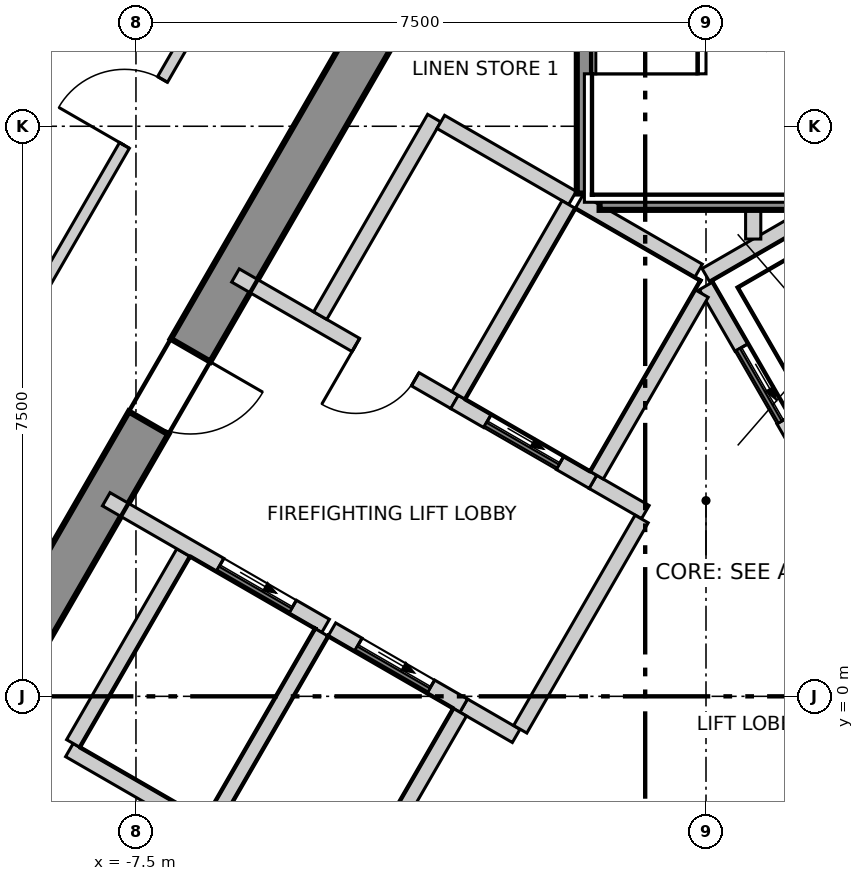
"""IFC4 building model, lengths in metres.
Left out: names, types, materials, properties, quantities, classifications, styles, units other than length and angle.
Written with IfcOpenShell. Run it as: python <this file> out.ifc"""

import sys

from ifc_helpers import new_model, si_unit, direction, frame, frame_2d, origin, place, context, subcontext, project, spatial, polyline, rectangle, outline, extrude, element, fill, save


model = new_model("IFC4")
c1 = context("Model", 3, precision=1e-05, world=origin(), true_north=direction((0.0, 1.0)))
c2 = subcontext(c1, "Body", "Model", "MODEL_VIEW")
j1 = project(units=[si_unit("LENGTHUNIT", "METRE"), si_unit("PLANEANGLEUNIT", "RADIAN")], contexts=[c1])
p1 = place(None, origin())
s1 = spatial("IfcSite", under=j1, at=p1, CompositionType="ELEMENT")
p2 = place(p1, origin())
s2 = spatial("IfcBuilding", under=s1, at=p2, CompositionType="ELEMENT")
p3 = place(p2, frame((0.0, 0.0, 300.7)))
s3 = spatial("IfcBuildingStorey", under=s2, at=p3, CompositionType="ELEMENT", Elevation=300.7)
p4 = place(p3, frame((-1.732, 13.3, -0.3), z_axis=(0.0, 0.0, 1.0), x_axis=(-0.500000539815, -0.866025092122, 0.0)))
e1 = element("IfcWall", 1, at=p4, inside=s3, PredefinedType="SHEAR", context=c2, shape_type="SweptSolid", body=[
    extrude(outline(polyline([(-0.173, -0.3), (1.795, -0.3), (3.763, -0.3), (5.732, -0.3), (7.7, -0.3), (9.668, -0.301), (11.637, -0.301), (13.605, -0.301), (15.573, -0.301), (17.542, -0.301), (19.51, -0.301), (21.478, -0.301), (21.131, 0.3), (19.226, 0.3), (17.321, 0.3), (15.415, 0.3), (13.51, 0.3), (11.605, 0.3), (9.699, 0.3), (7.794, 0.3), (5.889, 0.3), (3.984, 0.3), (2.078, 0.3), (0.173, 0.3), (-0.173, -0.3)])), origin(), (0.0, 0.0, 1.0), 3.6),
])
p5 = place(p4, frame((10.102, 0.0, 0.3)))
e2 = element("IfcOpeningElement", 2, at=p5, cuts=e1, PredefinedType="OPENING", context=c2, shape_type="SweptSolid", body=[
    extrude(rectangle(XDim=1.1, YDim=2.1, at=frame_2d((0.55, 1.05))), frame((0.0, 0.31, 0.0), z_axis=(0.0, -1.0, 0.0), x_axis=(1.0, 0.0, 0.0)), (0.0, 0.0, 1.0), 0.621),
])
p6 = place(p4, frame((16.378, 0.0, 0.3)))
e3 = element("IfcOpeningElement", 3, at=p6, cuts=e1, PredefinedType="OPENING", context=c2, shape_type="SweptSolid", body=[
    extrude(rectangle(XDim=0.9, YDim=2.1, at=frame_2d((0.45, 1.05))), frame((0.0, 0.31, 0.0), z_axis=(0.0, -1.0, 0.0), x_axis=(1.0, 0.0, 0.0)), (0.0, 0.0, 1.0), 0.621),
])
p7 = place(p4, frame((4.026, 0.0, 0.3)))
e4 = element("IfcOpeningElement", 4, at=p7, cuts=e1, PredefinedType="OPENING", context=c2, shape_type="SweptSolid", body=[
    extrude(rectangle(XDim=0.9, YDim=2.1, at=frame_2d((0.45, 1.05))), frame((0.0, 0.31, 0.0), z_axis=(0.0, -1.0, 0.0), x_axis=(1.0, 0.0, 0.0)), (0.0, 0.0, 1.0), 0.621),
])
p8 = place(p3, frame((-2.453, 27.405, 0.0), z_axis=(0.0, 0.0, 1.0), x_axis=(-0.500000041859, -0.866025379617, 0.0)))
e5 = element("IfcWall", 5, at=p8, inside=s3, PredefinedType="ELEMENTEDWALL", context=c2, shape_type="SweptSolid", body=[
    extrude(rectangle(XDim=44.994, YDim=0.2, at=frame_2d((22.497, 0.0))), origin(), (0.0, 0.0, 1.0), 3.3),
])
p9 = place(p8, frame((2.103, 0.0, 0.9)))
e6 = element("IfcOpeningElement", 6, at=p9, cuts=e5, PredefinedType="OPENING", context=c2, shape_type="SweptSolid", body=[
    extrude(rectangle(XDim=3.7, YDim=2.2, at=frame_2d((1.85, 1.1))), frame((0.0, 0.11, 0.0), z_axis=(0.0, -1.0, 0.0), x_axis=(1.0, 0.0, 0.0)), (0.0, 0.0, 1.0), 0.22),
])
p10 = place(p8, frame((7.404, 0.0, 0.9)))
e7 = element("IfcOpeningElement", 7, at=p10, cuts=e5, PredefinedType="OPENING", context=c2, shape_type="SweptSolid", body=[
    extrude(rectangle(XDim=3.7, YDim=2.2, at=frame_2d((1.85, 1.1))), frame((0.0, 0.11, 0.0), z_axis=(0.0, -1.0, 0.0), x_axis=(1.0, 0.0, 0.0)), (0.0, 0.0, 1.0), 0.22),
])
p11 = place(p8, frame((12.705, 0.0, 0.9)))
e8 = element("IfcOpeningElement", 8, at=p11, cuts=e5, PredefinedType="OPENING", context=c2, shape_type="SweptSolid", body=[
    extrude(rectangle(XDim=3.7, YDim=2.2, at=frame_2d((1.85, 1.1))), frame((0.0, 0.11, 0.0), z_axis=(0.0, -1.0, 0.0), x_axis=(1.0, 0.0, 0.0)), (0.0, 0.0, 1.0), 0.22),
])
p12 = place(p8, frame((18.006, 0.0, 0.9)))
e9 = element("IfcOpeningElement", 9, at=p12, cuts=e5, PredefinedType="OPENING", context=c2, shape_type="SweptSolid", body=[
    extrude(rectangle(XDim=3.7, YDim=2.2, at=frame_2d((1.85, 1.1))), frame((0.0, 0.11, 0.0), z_axis=(0.0, -1.0, 0.0), x_axis=(1.0, 0.0, 0.0)), (0.0, 0.0, 1.0), 0.22),
])
p13 = place(p8, frame((23.307, 0.0, 0.9)))
e10 = element("IfcOpeningElement", 10, at=p13, cuts=e5, PredefinedType="OPENING", context=c2, shape_type="SweptSolid", body=[
    extrude(rectangle(XDim=3.7, YDim=2.2, at=frame_2d((1.85, 1.1))), frame((0.0, 0.11, 0.0), z_axis=(0.0, -1.0, 0.0), x_axis=(1.0, 0.0, 0.0)), (0.0, 0.0, 1.0), 0.22),
])
p14 = place(p8, frame((28.608, 0.0, 0.9)))
e11 = element("IfcOpeningElement", 11, at=p14, cuts=e5, PredefinedType="OPENING", context=c2, shape_type="SweptSolid", body=[
    extrude(rectangle(XDim=3.7, YDim=2.2, at=frame_2d((1.85, 1.1))), frame((0.0, 0.11, 0.0), z_axis=(0.0, -1.0, 0.0), x_axis=(1.0, 0.0, 0.0)), (0.0, 0.0, 1.0), 0.22),
])
p15 = place(p8, frame((33.909, 0.0, 0.9)))
e12 = element("IfcOpeningElement", 12, at=p15, cuts=e5, PredefinedType="OPENING", context=c2, shape_type="SweptSolid", body=[
    extrude(rectangle(XDim=3.7, YDim=2.2, at=frame_2d((1.85, 1.1))), frame((0.0, 0.11, 0.0), z_axis=(0.0, -1.0, 0.0), x_axis=(1.0, 0.0, 0.0)), (0.0, 0.0, 1.0), 0.22),
])
p16 = place(p8, frame((39.21, 0.0, 0.9)))
e13 = element("IfcOpeningElement", 13, at=p16, cuts=e5, PredefinedType="OPENING", context=c2, shape_type="SweptSolid", body=[
    extrude(rectangle(XDim=3.7, YDim=2.2, at=frame_2d((1.85, 1.1))), frame((0.0, 0.11, 0.0), z_axis=(0.0, -1.0, 0.0), x_axis=(1.0, 0.0, 0.0)), (0.0, 0.0, 1.0), 0.22),
])
p17 = place(p3, frame((-17.679, -10.12, 0.0), z_axis=(0.0, 0.0, 1.0), x_axis=(0.500008955215, 0.866020233427, 0.0)))
e14 = element("IfcWall", 14, at=p17, inside=s3, PredefinedType="PARTITIONING", context=c2, shape_type="SweptSolid", body=[
    extrude(rectangle(XDim=35.357, YDim=0.15, at=frame_2d((17.679, 0.0))), origin(), (0.0, 0.0, 1.0), 3.3),
])
p18 = place(p17, frame((31.307, 0.0, 0.0)))
e15 = element("IfcOpeningElement", 15, at=p18, cuts=e14, PredefinedType="OPENING", context=c2, shape_type="SweptSolid", body=[
    extrude(rectangle(XDim=1.0, YDim=2.1, at=frame_2d((0.5, 1.05))), frame((0.0, 0.085, 0.0), z_axis=(0.0, -1.0, 0.0), x_axis=(1.0, 0.0, 0.0)), (0.0, 0.0, 1.0), 0.17),
])
p19 = place(p17, frame((20.056, 0.0, 0.0)))
e16 = element("IfcOpeningElement", 16, at=p19, cuts=e14, PredefinedType="OPENING", context=c2, shape_type="SweptSolid", body=[
    extrude(rectangle(XDim=1.0, YDim=2.1, at=frame_2d((0.5, 1.05))), frame((0.0, 0.085, 0.0), z_axis=(0.0, -1.0, 0.0), x_axis=(1.0, 0.0, 0.0)), (0.0, 0.0, 1.0), 0.17),
])
p20 = place(p17, frame((13.253, 0.0, 0.0)))
e17 = element("IfcOpeningElement", 17, at=p20, cuts=e14, PredefinedType="OPENING", context=c2, shape_type="SweptSolid", body=[
    extrude(rectangle(XDim=1.0, YDim=2.1, at=frame_2d((0.5, 1.05))), frame((0.0, 0.085, 0.0), z_axis=(0.0, -1.0, 0.0), x_axis=(1.0, 0.0, 0.0)), (0.0, 0.0, 1.0), 0.17),
])
p21 = place(p17, frame((7.653, 0.0, 0.0)))
e18 = element("IfcOpeningElement", 18, at=p21, cuts=e14, PredefinedType="OPENING", context=c2, shape_type="SweptSolid", body=[
    extrude(rectangle(XDim=1.0, YDim=2.1, at=frame_2d((0.5, 1.05))), frame((0.0, 0.085, 0.0), z_axis=(0.0, -1.0, 0.0), x_axis=(1.0, 0.0, 0.0)), (0.0, 0.0, 1.0), 0.17),
])
p22 = place(p17, frame((2.952, 0.0, 0.0)))
e19 = element("IfcOpeningElement", 19, at=p22, cuts=e14, PredefinedType="OPENING", context=c2, shape_type="SweptSolid", body=[
    extrude(rectangle(XDim=1.0, YDim=2.1, at=frame_2d((0.5, 1.05))), frame((0.0, 0.085, 0.0), z_axis=(0.0, -1.0, 0.0), x_axis=(1.0, 0.0, 0.0)), (0.0, 0.0, 1.0), 0.17),
])
p23 = place(p3, frame((0.075, 20.37, 0.0), z_axis=(0.0, 0.0, 1.0), x_axis=(0.500009775255, -0.866019759965, 0.0)))
e20 = element("IfcWall", 20, at=p23, inside=s3, PredefinedType="PARTITIONING", context=c2, shape_type="SweptSolid", body=[
    extrude(rectangle(XDim=35.207, YDim=0.15, at=frame_2d((17.604, 0.0))), origin(), (0.0, 0.0, 1.0), 3.3),
])
p24 = place(p23, frame((31.307, 0.0, 0.0)))
e21 = element("IfcOpeningElement", 21, at=p24, cuts=e20, PredefinedType="OPENING", context=c2, shape_type="SweptSolid", body=[
    extrude(rectangle(XDim=1.0, YDim=2.1, at=frame_2d((0.5, 1.05))), frame((0.0, 0.085, 0.0), z_axis=(0.0, -1.0, 0.0), x_axis=(1.0, 0.0, 0.0)), (0.0, 0.0, 1.0), 0.17),
])
p25 = place(p23, frame((20.355, 0.0, 0.0)))
e22 = element("IfcOpeningElement", 22, at=p25, cuts=e20, PredefinedType="OPENING", context=c2, shape_type="SweptSolid", body=[
    extrude(rectangle(XDim=1.0, YDim=2.1, at=frame_2d((0.5, 1.05))), frame((0.0, 0.085, 0.0), z_axis=(0.0, -1.0, 0.0), x_axis=(1.0, 0.0, 0.0)), (0.0, 0.0, 1.0), 0.17),
])
p26 = place(p23, frame((24.355, 0.0, 0.0)))
e23 = element("IfcOpeningElement", 23, at=p26, cuts=e20, PredefinedType="OPENING", context=c2, shape_type="SweptSolid", body=[
    extrude(rectangle(XDim=0.9, YDim=2.1, at=frame_2d((0.45, 1.05))), frame((0.0, 0.085, 0.0), z_axis=(0.0, -1.0, 0.0), x_axis=(1.0, 0.0, 0.0)), (0.0, 0.0, 1.0), 0.17),
])
p27 = place(p23, frame((22.255, 0.0, 0.0)))
e24 = element("IfcOpeningElement", 24, at=p27, cuts=e20, PredefinedType="OPENING", context=c2, shape_type="SweptSolid", body=[
    extrude(rectangle(XDim=0.9, YDim=2.1, at=frame_2d((0.45, 1.05))), frame((0.0, 0.085, 0.0), z_axis=(0.0, -1.0, 0.0), x_axis=(1.0, 0.0, 0.0)), (0.0, 0.0, 1.0), 0.17),
])
p28 = place(p23, frame((8.453, 0.0, 0.0)))
e25 = element("IfcOpeningElement", 25, at=p28, cuts=e20, PredefinedType="OPENING", context=c2, shape_type="SweptSolid", body=[
    extrude(rectangle(XDim=1.0, YDim=2.1, at=frame_2d((0.5, 1.05))), frame((0.0, 0.085, 0.0), z_axis=(0.0, -1.0, 0.0), x_axis=(1.0, 0.0, 0.0)), (0.0, 0.0, 1.0), 0.17),
])
p29 = place(p23, frame((13.753, 0.0, 0.0)))
e26 = element("IfcOpeningElement", 26, at=p29, cuts=e20, PredefinedType="OPENING", context=c2, shape_type="SweptSolid", body=[
    extrude(rectangle(XDim=0.9, YDim=2.1, at=frame_2d((0.45, 1.05))), frame((0.0, 0.085, 0.0), z_axis=(0.0, -1.0, 0.0), x_axis=(1.0, 0.0, 0.0)), (0.0, 0.0, 1.0), 0.17),
])
p30 = place(p23, frame((11.553, 0.0, 0.0)))
e27 = element("IfcOpeningElement", 27, at=p30, cuts=e20, PredefinedType="OPENING", context=c2, shape_type="SweptSolid", body=[
    extrude(rectangle(XDim=0.9, YDim=2.1, at=frame_2d((0.45, 1.05))), frame((0.0, 0.085, 0.0), z_axis=(0.0, -1.0, 0.0), x_axis=(1.0, 0.0, 0.0)), (0.0, 0.0, 1.0), 0.17),
])
p31 = place(p23, frame((2.951, 0.0, 0.0)))
e28 = element("IfcOpeningElement", 28, at=p31, cuts=e20, PredefinedType="OPENING", context=c2, shape_type="SweptSolid", body=[
    extrude(rectangle(XDim=1.0, YDim=2.1, at=frame_2d((0.5, 1.05))), frame((0.0, 0.085, 0.0), z_axis=(0.0, -1.0, 0.0), x_axis=(1.0, 0.0, 0.0)), (0.0, 0.0, 1.0), 0.17),
])
p32 = place(p3, frame((-8.376, -0.707, 0.0), z_axis=(0.0, 0.0, 1.0), x_axis=(0.866067520717, -0.499927044236, 0.0)))
e29 = element("IfcWall", 29, at=p32, inside=s3, PredefinedType="SOLIDWALL", context=c2, shape_type="SweptSolid", body=[
    extrude(rectangle(XDim=2.1, YDim=0.2, at=frame_2d((1.05, 0.0))), origin(), (0.0, 0.0, 1.0), 3.3),
])
p33 = place(p3, frame((-8.326, -0.62, 0.0), z_axis=(0.0, 0.0, 1.0), x_axis=(0.500023687443, 0.866011727401, 0.0)))
e30 = element("IfcWall", 30, at=p33, inside=s3, PredefinedType="SOLIDWALL", context=c2, shape_type="SweptSolid", body=[
    extrude(rectangle(XDim=2.9, YDim=0.2, at=frame_2d((1.45, 0.0))), origin(), (0.0, 0.0, 1.0), 3.3),
])
p34 = place(p3, frame((-0.002, 5.541, 0.0), z_axis=(0.0, 0.0, 1.0), x_axis=(0.86600155993, 0.500041296494, 0.0)))
e31 = element("IfcWall", 31, at=p34, inside=s3, PredefinedType="SOLIDWALL", context=c2, shape_type="SweptSolid", body=[
    extrude(rectangle(XDim=4.132, YDim=0.2, at=frame_2d((2.066, 0.0))), origin(), (0.0, 0.0, 1.0), 3.3),
])
p35 = place(p3, frame((0.0, 5.4, 0.0), z_axis=(0.0, 0.0, 1.0), x_axis=(0.500103862429, -0.865965430478, 0.0)))
e32 = element("IfcWall", 32, at=p35, inside=s3, PredefinedType="SOLIDWALL", context=c2, shape_type="SweptSolid", body=[
    extrude(rectangle(XDim=2.973, YDim=0.2, at=frame_2d((1.487, 0.0))), origin(), (0.0, 0.0, 1.0), 3.3),
])
p36 = place(p35, frame((0.937, 0.0, 0.0)))
e33 = element("IfcOpeningElement", 33, at=p36, cuts=e32, PredefinedType="OPENING", context=c2, shape_type="SweptSolid", body=[
    extrude(rectangle(XDim=1.1, YDim=2.1, at=frame_2d((0.55, 1.05))), frame((0.0, 0.11, 0.0), z_axis=(0.0, -1.0, 0.0), x_axis=(1.0, 0.0, 0.0)), (0.0, 0.0, 1.0), 0.22),
])
p37 = place(p3, frame((-7.891, 2.593, 0.0), z_axis=(0.0, 0.0, 1.0), x_axis=(0.866070917804, -0.499921159118, 0.0)))
e34 = element("IfcWall", 34, at=p37, inside=s3, PredefinedType="SOLIDWALL", context=c2, shape_type="SweptSolid", body=[
    extrude(rectangle(XDim=3.333, YDim=0.2, at=frame_2d((1.666, 0.0))), origin(), (0.0, 0.0, 1.0), 3.3),
])
p38 = place(p37, frame((1.73, 0.0, 0.0)))
e35 = element("IfcOpeningElement", 35, at=p38, cuts=e34, PredefinedType="OPENING", context=c2, shape_type="SweptSolid", body=[
    extrude(rectangle(XDim=1.1, YDim=2.1, at=frame_2d((0.55, 1.05))), frame((0.0, 0.11, 0.0), z_axis=(0.0, -1.0, 0.0), x_axis=(1.0, 0.0, 0.0)), (0.0, 0.0, 1.0), 0.22),
])
p39 = place(p3, frame((-3.188, -0.122, 0.0), z_axis=(0.0, 0.0, 1.0), x_axis=(0.865705793592, -0.50055317294, 0.0)))
e36 = element("IfcWall", 36, at=p39, inside=s3, PredefinedType="SOLIDWALL", context=c2, shape_type="SweptSolid", body=[
    extrude(rectangle(XDim=0.797, YDim=0.2, at=frame_2d((0.398, 0.0))), origin(), (0.0, 0.0, 1.0), 3.3),
])
p40 = place(p3, frame((-6.191, 5.537, 0.0), z_axis=(0.0, 0.0, 1.0), x_axis=(0.866052607023, -0.499952879648, 0.0)))
e37 = element("IfcWall", 37, at=p40, inside=s3, PredefinedType="SOLIDWALL", context=c2, shape_type="SweptSolid", body=[
    extrude(rectangle(XDim=3.332, YDim=0.2, at=frame_2d((1.666, 0.0))), origin(), (0.0, 0.0, 1.0), 3.3),
])
p41 = place(p40, frame((1.83, 0.0, 0.0)))
e38 = element("IfcOpeningElement", 38, at=p41, cuts=e37, PredefinedType="OPENING", context=c2, shape_type="SweptSolid", body=[
    extrude(rectangle(XDim=0.9, YDim=2.1, at=frame_2d((0.45, 1.05))), frame((0.0, 0.11, 0.0), z_axis=(0.0, -1.0, 0.0), x_axis=(1.0, 0.0, 0.0)), (0.0, 0.0, 1.0), 0.22),
])
p42 = place(p3, frame((-1.488, 2.822, 0.0), z_axis=(0.0, 0.0, 1.0), x_axis=(0.866236612152, -0.499633997809, 0.0)))
e39 = element("IfcWall", 39, at=p42, inside=s3, PredefinedType="SOLIDWALL", context=c2, shape_type="SweptSolid", body=[
    extrude(rectangle(XDim=0.796, YDim=0.2, at=frame_2d((0.398, 0.0))), origin(), (0.0, 0.0, 1.0), 3.3),
])
p43 = place(p3, frame((-5.076, 5.009, 0.0), z_axis=(0.0, 0.0, 1.0), x_axis=(0.50002537861, 0.866010750942, 0.0)))
e40 = element("IfcWall", 40, at=p43, inside=s3, PredefinedType="SOLIDWALL", context=c2, shape_type="SweptSolid", body=[
    extrude(rectangle(XDim=3.0, YDim=0.2, at=frame_2d((1.5, 0.0))), origin(), (0.0, 0.0, 1.0), 3.3),
])
p44 = place(p3, frame((-3.489, 7.557, 0.0), z_axis=(0.0, 0.0, 1.0), x_axis=(0.866010750942, -0.50002537861, 0.0)))
e41 = element("IfcWall", 41, at=p44, inside=s3, PredefinedType="SOLIDWALL", context=c2, shape_type="SweptSolid", body=[
    extrude(rectangle(XDim=2.0, YDim=0.2, at=frame_2d((1.0, 0.0))), origin(), (0.0, 0.0, 1.0), 3.3),
])
p45 = place(p3, frame((-2.444, -0.433, 0.0), z_axis=(0.0, 0.0, 1.0), x_axis=(0.500035624827, 0.866004834804, 0.0)))
e42 = element("IfcWall", 42, at=p45, inside=s3, PredefinedType="SOLIDWALL", context=c2, shape_type="SweptSolid", body=[
    extrude(rectangle(XDim=3.194, YDim=0.2, at=frame_2d((1.597, 0.0))), origin(), (0.0, 0.0, 1.0), 3.3),
])
p46 = place(p3, frame((-6.507, -1.67, 0.0), z_axis=(0.0, 0.0, 1.0), x_axis=(0.50012328804, 0.865954211699, 0.0)))
e43 = element("IfcWall", 43, at=p46, inside=s3, PredefinedType="SOLIDWALL", context=c2, shape_type="SweptSolid", body=[
    extrude(rectangle(XDim=2.9, YDim=0.2, at=frame_2d((1.45, 0.0))), origin(), (0.0, 0.0, 1.0), 3.3),
])
p47 = place(p3, frame((-4.922, 0.879, 0.0), z_axis=(0.0, 0.0, 1.0), x_axis=(0.866073918653, -0.499915960366, 0.0)))
e44 = element("IfcWall", 44, at=p47, inside=s3, PredefinedType="SOLIDWALL", context=c2, shape_type="SweptSolid", body=[
    extrude(rectangle(XDim=2.002, YDim=0.2, at=frame_2d((1.001, 0.0))), origin(), (0.0, 0.0, 1.0), 3.3),
])
p48 = place(p47, frame((0.402, 0.0, 0.0)))
e45 = element("IfcOpeningElement", 45, at=p48, cuts=e44, PredefinedType="OPENING", context=c2, shape_type="SweptSolid", body=[
    extrude(rectangle(XDim=1.1, YDim=2.1, at=frame_2d((0.55, 1.05))), frame((0.0, 0.11, 0.0), z_axis=(0.0, -1.0, 0.0), x_axis=(1.0, 0.0, 0.0)), (0.0, 0.0, 1.0), 0.22),
])
p49 = place(p3, frame((-4.619, -2.6, 0.0), z_axis=(0.0, 0.0, 1.0), x_axis=(0.50009492287, 0.865970593103, 0.0)))
e46 = element("IfcWall", 46, at=p49, inside=s3, PredefinedType="SOLIDWALL", context=c2, shape_type="SweptSolid", body=[
    extrude(rectangle(XDim=2.761, YDim=0.2, at=frame_2d((1.381, 0.0))), origin(), (0.0, 0.0, 1.0), 3.3),
])
p50 = place(p3, frame((-3.309, 3.873, 0.0), z_axis=(0.0, 0.0, 1.0), x_axis=(0.866098583652, -0.499873227325, 0.0)))
e47 = element("IfcWall", 47, at=p50, inside=s3, PredefinedType="SOLIDWALL", context=c2, shape_type="SweptSolid", body=[
    extrude(rectangle(XDim=2.103, YDim=0.2, at=frame_2d((1.051, 0.0))), origin(), (0.0, 0.0, 1.0), 3.3),
])
p51 = place(p50, frame((0.502, 0.0, 0.0)))
e48 = element("IfcOpeningElement", 48, at=p51, cuts=e47, PredefinedType="OPENING", context=c2, shape_type="SweptSolid", body=[
    extrude(rectangle(XDim=1.1, YDim=2.1, at=frame_2d((0.55, 1.05))), frame((0.0, 0.11, 0.0), z_axis=(0.0, -1.0, 0.0), x_axis=(1.0, 0.0, 0.0)), (0.0, 0.0, 1.0), 0.22),
])
p52 = place(p3, frame((-3.257, 3.959, 0.0), z_axis=(0.0, 0.0, 1.0), x_axis=(0.50012328804, 0.865954211699, 0.0)))
e49 = element("IfcWall", 49, at=p52, inside=s3, PredefinedType="SOLIDWALL", context=c2, shape_type="SweptSolid", body=[
    extrude(rectangle(XDim=2.9, YDim=0.2, at=frame_2d((1.45, 0.0))), origin(), (0.0, 0.0, 1.0), 3.3),
])
p53 = place(p3, frame((-1.67, 6.507, 0.0), z_axis=(0.0, 0.0, 1.0), x_axis=(0.865941441609, -0.500145398563, 0.0)))
e50 = element("IfcWall", 50, at=p53, inside=s3, PredefinedType="SOLIDWALL", context=c2, shape_type="SweptSolid", body=[
    extrude(rectangle(XDim=1.815, YDim=0.2, at=frame_2d((0.908, 0.0))), origin(), (0.0, 0.0, 1.0), 3.3),
])
p54 = place(p3, frame((-1.438, 2.909, 0.0), z_axis=(0.0, 0.0, 1.0), x_axis=(0.499829630636, 0.866123744241, 0.0)))
e51 = element("IfcWall", 51, at=p54, inside=s3, PredefinedType="SOLIDWALL", context=c2, shape_type="SweptSolid", body=[
    extrude(rectangle(XDim=2.761, YDim=0.2, at=frame_2d((1.38, 0.0))), origin(), (0.0, 0.0, 1.0), 3.3),
])
p55 = place(p3, frame((0.621, 6.016, 0.0), z_axis=(0.0, 0.0, 1.0), x_axis=(0.0, 1.0, 0.0)))
e52 = element("IfcWall", 52, at=p55, inside=s3, PredefinedType="SOLIDWALL", context=c2, shape_type="SweptSolid", body=[
    extrude(rectangle(XDim=0.384, YDim=0.2, at=frame_2d((0.192, 0.0))), origin(), (0.0, 0.0, 1.0), 3.3),
])
p56 = place(p3, frame((-1.4, 6.5, 0.0), z_axis=(0.0, 0.0, 1.0), x_axis=(1.0, 0.0, 0.0)))
e53 = element("IfcWall", 53, at=p56, inside=s3, PredefinedType="SOLIDWALL", context=c2, shape_type="SweptSolid", body=[
    extrude(rectangle(XDim=2.8, YDim=0.2, at=frame_2d((1.4, 0.0))), origin(), (0.0, 0.0, 1.0), 3.3),
])
p57 = place(p3, frame((-1.6, 6.615, 0.0), z_axis=(0.0, 0.0, 1.0), x_axis=(0.0, 1.0, 0.0)))
e54 = element("IfcWall", 54, at=p57, inside=s3, PredefinedType="SOLIDWALL", context=c2, shape_type="SweptSolid", body=[
    extrude(rectangle(XDim=6.665, YDim=0.2, at=frame_2d((3.333, 0.0))), origin(), (0.0, 0.0, 1.0), 3.3),
])
p58 = place(p36, origin())
e55 = element("IfcDoor", 55, at=p58, inside=s3, OperationType="SLIDING_TO_LEFT", PredefinedType="DOOR", context=c2, shape_type="SweptSolid", body=[
    extrude(rectangle(XDim=1.1, YDim=2.1, at=frame_2d((0.55, 1.05))), frame((0.0, 0.025, 0.0), z_axis=(0.0, -1.0, 0.0), x_axis=(1.0, 0.0, 0.0)), (0.0, 0.0, 1.0), 0.05),
])
fill(e33, e55)
p59 = place(p48, origin())
e56 = element("IfcDoor", 56, at=p59, inside=s3, OperationType="SLIDING_TO_LEFT", PredefinedType="DOOR", context=c2, shape_type="SweptSolid", body=[
    extrude(rectangle(XDim=1.1, YDim=2.1, at=frame_2d((0.55, 1.05))), frame((0.0, 0.025, 0.0), z_axis=(0.0, -1.0, 0.0), x_axis=(1.0, 0.0, 0.0)), (0.0, 0.0, 1.0), 0.05),
])
fill(e45, e56)
p60 = place(p51, origin())
e57 = element("IfcDoor", 57, at=p60, inside=s3, OperationType="SLIDING_TO_LEFT", PredefinedType="DOOR", context=c2, shape_type="SweptSolid", body=[
    extrude(rectangle(XDim=1.1, YDim=2.1, at=frame_2d((0.55, 1.05))), frame((0.0, 0.025, 0.0), z_axis=(0.0, -1.0, 0.0), x_axis=(1.0, 0.0, 0.0)), (0.0, 0.0, 1.0), 0.05),
])
fill(e48, e57)
p61 = place(p38, origin())
e58 = element("IfcDoor", 58, at=p61, inside=s3, OperationType="SLIDING_TO_LEFT", PredefinedType="DOOR", context=c2, shape_type="SweptSolid", body=[
    extrude(rectangle(XDim=1.1, YDim=2.1, at=frame_2d((0.55, 1.05))), frame((0.0, 0.025, 0.0), z_axis=(0.0, -1.0, 0.0), x_axis=(1.0, 0.0, 0.0)), (0.0, 0.0, 1.0), 0.05),
])
fill(e35, e58)
p62 = place(p41, origin())
e59 = element("IfcDoor", 59, at=p62, inside=s3, OperationType="SINGLE_SWING_LEFT", PredefinedType="DOOR", context=c2, shape_type="SweptSolid", body=[
    extrude(rectangle(XDim=0.9, YDim=2.1, at=frame_2d((0.45, 1.05))), frame((0.0, 0.025, 0.0), z_axis=(0.0, -1.0, 0.0), x_axis=(1.0, 0.0, 0.0)), (0.0, 0.0, 1.0), 0.05),
])
fill(e38, e59)
p63 = place(p19, origin())
e60 = element("IfcDoor", 60, at=p63, inside=s3, OperationType="SINGLE_SWING_RIGHT", PredefinedType="DOOR", context=c2, shape_type="SweptSolid", body=[
    extrude(rectangle(XDim=1.0, YDim=2.1, at=frame_2d((0.5, 1.05))), frame((0.0, 0.025, 0.0), z_axis=(0.0, -1.0, 0.0), x_axis=(1.0, 0.0, 0.0)), (0.0, 0.0, 1.0), 0.05),
])
fill(e16, e60)
p64 = place(p5, origin())
e61 = element("IfcDoor", 61, at=p64, inside=s3, OperationType="SINGLE_SWING_RIGHT", PredefinedType="DOOR", context=c2, shape_type="SweptSolid", body=[
    extrude(rectangle(XDim=1.1, YDim=2.1, at=frame_2d((0.55, 1.05))), frame((0.0, 0.025, 0.0), z_axis=(0.0, -1.0, 0.0), x_axis=(1.0, 0.0, 0.0)), (0.0, 0.0, 1.0), 0.05),
])
fill(e2, e61)
save(model, sys.argv[1])
